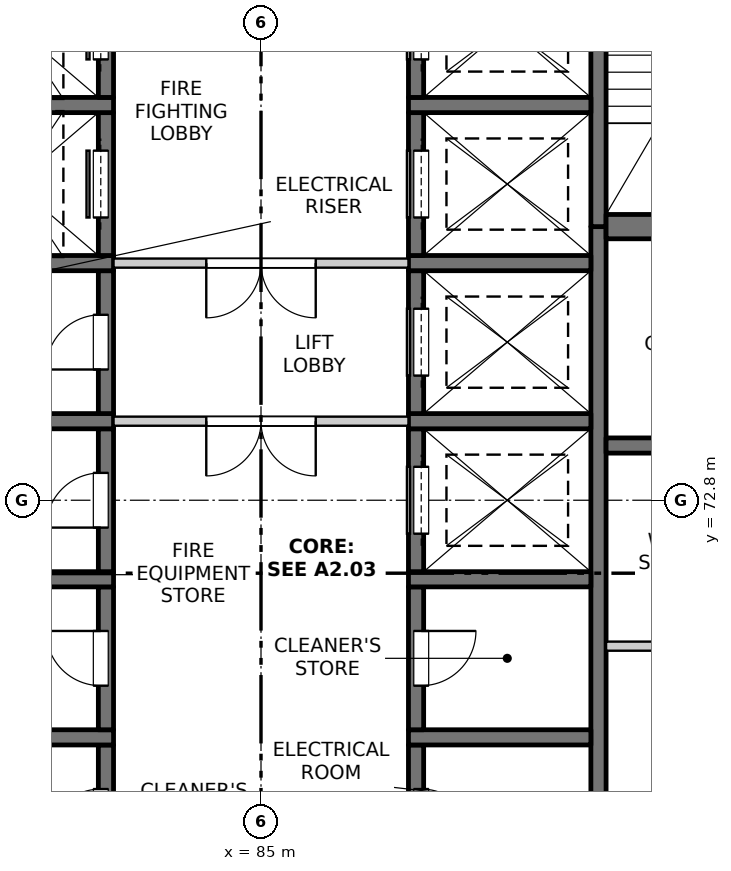
"""IFC4 building model, lengths in metres.
Left out: names, types, materials, properties, quantities, classifications, styles, units other than length and angle.
Written with IfcOpenShell. Run it as: python <this file> out.ifc"""

import sys

from ifc_helpers import new_model, si_unit, direction, frame, frame_2d, origin, place, context, subcontext, project, spatial, rectangle, extrude, element, fill, save


model = new_model("IFC4")
c1 = context("Model", 3, precision=1e-05, world=origin(), true_north=direction((0.0, 1.0)))
c2 = subcontext(c1, "Body", "Model", "MODEL_VIEW")
j1 = project(units=[si_unit("LENGTHUNIT", "METRE"), si_unit("PLANEANGLEUNIT", "RADIAN")], contexts=[c1])
p1 = place(None, origin())
s1 = spatial("IfcSite", under=j1, at=p1, CompositionType="ELEMENT")
p2 = place(p1, origin())
s2 = spatial("IfcBuilding", under=s1, at=p2, CompositionType="ELEMENT")
p3 = place(p2, frame((0.0, 0.0, 204.1)))
s3 = spatial("IfcBuildingStorey", under=s2, at=p3, CompositionType="ELEMENT", Elevation=204.1)
p4 = place(p3, frame((90.55, 61.95, -0.25), z_axis=(0.0, 0.0, 1.0), x_axis=(0.0, 1.0, 0.0)))
e1 = element("IfcWall", 1, at=p4, inside=s3, PredefinedType="SOLIDWALL", context=c2, shape_type="SweptSolid", body=[
    extrude(rectangle(XDim=15.35, YDim=0.25, at=frame_2d((7.675, 0.0))), origin(), (0.0, 0.0, 1.0), 3.4),
])
p5 = place(p3, frame((90.55, 77.3, -0.25), z_axis=(0.0, 0.0, 1.0), x_axis=(0.0, 1.0, 0.0)))
e2 = element("IfcWall", 2, at=p5, inside=s3, PredefinedType="SOLIDWALL", context=c2, shape_type="SweptSolid", body=[
    extrude(rectangle(XDim=7.0, YDim=0.25, at=frame_2d((3.5, 0.0))), origin(), (0.0, 0.0, 1.0), 3.4),
])
p6 = place(p3, frame((82.45, 66.425, -0.25), z_axis=(0.0, 0.0, 1.0), x_axis=(0.0, 1.0, 0.0)))
e3 = element("IfcWall", 3, at=p6, inside=s3, PredefinedType="SOLIDWALL", context=c2, shape_type="SweptSolid", body=[
    extrude(rectangle(XDim=2.35, YDim=0.25, at=frame_2d((1.175, 0.0))), origin(), (0.0, 0.0, 1.0), 3.4),
])
p7 = place(p6, frame((0.725, 0.0, 0.25)))
e4 = element("IfcOpeningElement", 4, at=p7, cuts=e3, PredefinedType="OPENING", context=c2, shape_type="SweptSolid", body=[
    extrude(rectangle(XDim=0.9, YDim=2.1, at=frame_2d((0.45, 1.05))), frame((0.0, 0.135, 0.0), z_axis=(0.0, -1.0, 0.0), x_axis=(1.0, 0.0, 0.0)), (0.0, 0.0, 1.0), 0.27),
])
p8 = place(p3, frame((79.575, 68.9, -0.25), z_axis=(0.0, 0.0, 1.0), x_axis=(1.0, 0.0, 0.0)))
e5 = element("IfcWall", 5, at=p8, inside=s3, PredefinedType="SOLIDWALL", context=c2, shape_type="SweptSolid", body=[
    extrude(rectangle(XDim=3.0, YDim=0.25, at=frame_2d((1.5, 0.0))), origin(), (0.0, 0.0, 1.0), 3.4),
])
p9 = place(p3, frame((82.45, 69.025, -0.25), z_axis=(0.0, 0.0, 1.0), x_axis=(0.0, 1.0, 0.0)))
e6 = element("IfcWall", 6, at=p9, inside=s3, PredefinedType="SOLIDWALL", context=c2, shape_type="SweptSolid", body=[
    extrude(rectangle(XDim=2.35, YDim=0.25, at=frame_2d((1.175, 0.0))), origin(), (0.0, 0.0, 1.0), 3.4),
])
p10 = place(p9, frame((0.725, 0.0, 0.25)))
e7 = element("IfcOpeningElement", 7, at=p10, cuts=e6, PredefinedType="OPENING", context=c2, shape_type="SweptSolid", body=[
    extrude(rectangle(XDim=0.9, YDim=2.1, at=frame_2d((0.45, 1.05))), frame((0.0, 0.135, 0.0), z_axis=(0.0, -1.0, 0.0), x_axis=(1.0, 0.0, 0.0)), (0.0, 0.0, 1.0), 0.27),
])
p11 = place(p3, frame((79.575, 71.5, -0.25), z_axis=(0.0, 0.0, 1.0), x_axis=(1.0, 0.0, 0.0)))
e8 = element("IfcWall", 8, at=p11, inside=s3, PredefinedType="SOLIDWALL", context=c2, shape_type="SweptSolid", body=[
    extrude(rectangle(XDim=3.0, YDim=0.25, at=frame_2d((1.5, 0.0))), origin(), (0.0, 0.0, 1.0), 3.4),
])
p12 = place(p3, frame((82.45, 71.625, -0.25), z_axis=(0.0, 0.0, 1.0), x_axis=(0.0, 1.0, 0.0)))
e9 = element("IfcWall", 9, at=p12, inside=s3, PredefinedType="SOLIDWALL", context=c2, shape_type="SweptSolid", body=[
    extrude(rectangle(XDim=2.35, YDim=0.25, at=frame_2d((1.175, 0.0))), origin(), (0.0, 0.0, 1.0), 3.4),
])
p13 = place(p12, frame((0.725, 0.0, 0.25)))
e10 = element("IfcOpeningElement", 10, at=p13, cuts=e9, PredefinedType="OPENING", context=c2, shape_type="SweptSolid", body=[
    extrude(rectangle(XDim=0.9, YDim=2.1, at=frame_2d((0.45, 1.05))), frame((0.0, 0.135, 0.0), z_axis=(0.0, -1.0, 0.0), x_axis=(1.0, 0.0, 0.0)), (0.0, 0.0, 1.0), 0.27),
])
p14 = place(p3, frame((79.575, 74.1, -0.25), z_axis=(0.0, 0.0, 1.0), x_axis=(1.0, 0.0, 0.0)))
e11 = element("IfcWall", 11, at=p14, inside=s3, PredefinedType="SOLIDWALL", context=c2, shape_type="SweptSolid", body=[
    extrude(rectangle(XDim=3.0, YDim=0.25, at=frame_2d((1.5, 0.0))), origin(), (0.0, 0.0, 1.0), 3.4),
])
p15 = place(p3, frame((82.45, 74.225, -0.25), z_axis=(0.0, 0.0, 1.0), x_axis=(0.0, 1.0, 0.0)))
e12 = element("IfcWall", 12, at=p15, inside=s3, PredefinedType="SOLIDWALL", context=c2, shape_type="SweptSolid", body=[
    extrude(rectangle(XDim=2.35, YDim=0.25, at=frame_2d((1.175, 0.0))), origin(), (0.0, 0.0, 1.0), 3.4),
])
p16 = place(p15, frame((0.725, 0.0, 0.25)))
e13 = element("IfcOpeningElement", 13, at=p16, cuts=e12, PredefinedType="OPENING", context=c2, shape_type="SweptSolid", body=[
    extrude(rectangle(XDim=0.9, YDim=2.1, at=frame_2d((0.45, 1.05))), frame((0.0, 0.135, 0.0), z_axis=(0.0, -1.0, 0.0), x_axis=(1.0, 0.0, 0.0)), (0.0, 0.0, 1.0), 0.27),
])
p17 = place(p3, frame((79.575, 76.7, -0.25), z_axis=(0.0, 0.0, 1.0), x_axis=(1.0, 0.0, 0.0)))
e14 = element("IfcWall", 14, at=p17, inside=s3, PredefinedType="SOLIDWALL", context=c2, shape_type="SweptSolid", body=[
    extrude(rectangle(XDim=3.0, YDim=0.25, at=frame_2d((1.5, 0.0))), origin(), (0.0, 0.0, 1.0), 3.4),
])
p18 = place(p3, frame((82.45, 76.825, -0.25), z_axis=(0.0, 0.0, 1.0), x_axis=(0.0, 1.0, 0.0)))
e15 = element("IfcWall", 15, at=p18, inside=s3, PredefinedType="SOLIDWALL", context=c2, shape_type="SweptSolid", body=[
    extrude(rectangle(XDim=2.35, YDim=0.25, at=frame_2d((1.175, 0.0))), origin(), (0.0, 0.0, 1.0), 3.4),
])
p19 = place(p18, frame((0.625, 0.0, 0.25)))
e16 = element("IfcOpeningElement", 16, at=p19, cuts=e15, PredefinedType="OPENING", context=c2, shape_type="SweptSolid", body=[
    extrude(rectangle(XDim=1.1, YDim=2.1, at=frame_2d((0.55, 1.05))), frame((0.0, 0.135, 0.0), z_axis=(0.0, -1.0, 0.0), x_axis=(1.0, 0.0, 0.0)), (0.0, 0.0, 1.0), 0.27),
])
p20 = place(p3, frame((79.575, 79.3, -0.25), z_axis=(0.0, 0.0, 1.0), x_axis=(1.0, 0.0, 0.0)))
e17 = element("IfcWall", 17, at=p20, inside=s3, PredefinedType="SOLIDWALL", context=c2, shape_type="SweptSolid", body=[
    extrude(rectangle(XDim=3.0, YDim=0.25, at=frame_2d((1.5, 0.0))), origin(), (0.0, 0.0, 1.0), 3.4),
])
p21 = place(p3, frame((82.45, 79.425, -0.25), z_axis=(0.0, 0.0, 1.0), x_axis=(0.0, 1.0, 0.0)))
e18 = element("IfcWall", 18, at=p21, inside=s3, PredefinedType="SOLIDWALL", context=c2, shape_type="SweptSolid", body=[
    extrude(rectangle(XDim=2.35, YDim=0.25, at=frame_2d((1.175, 0.0))), origin(), (0.0, 0.0, 1.0), 3.4),
])
p22 = place(p21, frame((0.625, 0.0, 0.25)))
e19 = element("IfcOpeningElement", 19, at=p22, cuts=e18, PredefinedType="OPENING", context=c2, shape_type="SweptSolid", body=[
    extrude(rectangle(XDim=1.1, YDim=2.1, at=frame_2d((0.55, 1.05))), frame((0.0, 0.135, 0.0), z_axis=(0.0, -1.0, 0.0), x_axis=(1.0, 0.0, 0.0)), (0.0, 0.0, 1.0), 0.27),
])
p23 = place(p3, frame((87.55, 66.425, -0.25), z_axis=(0.0, 0.0, 1.0), x_axis=(0.0, 1.0, 0.0)))
e20 = element("IfcWall", 20, at=p23, inside=s3, PredefinedType="SOLIDWALL", context=c2, shape_type="SweptSolid", body=[
    extrude(rectangle(XDim=2.35, YDim=0.25, at=frame_2d((1.175, 0.0))), origin(), (0.0, 0.0, 1.0), 3.4),
])
p24 = place(p23, frame((0.725, 0.0, 0.25)))
e21 = element("IfcOpeningElement", 21, at=p24, cuts=e20, PredefinedType="OPENING", context=c2, shape_type="SweptSolid", body=[
    extrude(rectangle(XDim=0.9, YDim=2.1, at=frame_2d((0.45, 1.05))), frame((0.0, 0.135, 0.0), z_axis=(0.0, -1.0, 0.0), x_axis=(1.0, 0.0, 0.0)), (0.0, 0.0, 1.0), 0.27),
])
p25 = place(p3, frame((87.425, 68.9, -0.25), z_axis=(0.0, 0.0, 1.0), x_axis=(1.0, 0.0, 0.0)))
e22 = element("IfcWall", 22, at=p25, inside=s3, PredefinedType="SOLIDWALL", context=c2, shape_type="SweptSolid", body=[
    extrude(rectangle(XDim=3.0, YDim=0.25, at=frame_2d((1.5, 0.0))), origin(), (0.0, 0.0, 1.0), 3.4),
])
p26 = place(p3, frame((87.55, 69.025, -0.25), z_axis=(0.0, 0.0, 1.0), x_axis=(0.0, 1.0, 0.0)))
e23 = element("IfcWall", 23, at=p26, inside=s3, PredefinedType="SOLIDWALL", context=c2, shape_type="SweptSolid", body=[
    extrude(rectangle(XDim=2.35, YDim=0.25, at=frame_2d((1.175, 0.0))), origin(), (0.0, 0.0, 1.0), 3.4),
])
p27 = place(p26, frame((0.725, 0.0, 0.25)))
e24 = element("IfcOpeningElement", 24, at=p27, cuts=e23, PredefinedType="OPENING", context=c2, shape_type="SweptSolid", body=[
    extrude(rectangle(XDim=0.9, YDim=2.1, at=frame_2d((0.45, 1.05))), frame((0.0, 0.135, 0.0), z_axis=(0.0, -1.0, 0.0), x_axis=(1.0, 0.0, 0.0)), (0.0, 0.0, 1.0), 0.27),
])
p28 = place(p3, frame((87.425, 71.5, -0.25), z_axis=(0.0, 0.0, 1.0), x_axis=(1.0, 0.0, 0.0)))
e25 = element("IfcWall", 25, at=p28, inside=s3, PredefinedType="SOLIDWALL", context=c2, shape_type="SweptSolid", body=[
    extrude(rectangle(XDim=3.0, YDim=0.25, at=frame_2d((1.5, 0.0))), origin(), (0.0, 0.0, 1.0), 3.4),
])
p29 = place(p3, frame((87.55, 71.625, -0.25), z_axis=(0.0, 0.0, 1.0), x_axis=(0.0, 1.0, 0.0)))
e26 = element("IfcWall", 26, at=p29, inside=s3, PredefinedType="SOLIDWALL", context=c2, shape_type="SweptSolid", body=[
    extrude(rectangle(XDim=2.35, YDim=0.25, at=frame_2d((1.175, 0.0))), origin(), (0.0, 0.0, 1.0), 3.4),
])
p30 = place(p29, frame((0.625, 0.0, 0.25)))
e27 = element("IfcOpeningElement", 27, at=p30, cuts=e26, PredefinedType="OPENING", context=c2, shape_type="SweptSolid", body=[
    extrude(rectangle(XDim=1.1, YDim=2.1, at=frame_2d((0.55, 1.05))), frame((0.0, 0.135, 0.0), z_axis=(0.0, -1.0, 0.0), x_axis=(1.0, 0.0, 0.0)), (0.0, 0.0, 1.0), 0.27),
])
p31 = place(p3, frame((87.425, 74.1, -0.25), z_axis=(0.0, 0.0, 1.0), x_axis=(1.0, 0.0, 0.0)))
e28 = element("IfcWall", 28, at=p31, inside=s3, PredefinedType="SOLIDWALL", context=c2, shape_type="SweptSolid", body=[
    extrude(rectangle(XDim=3.0, YDim=0.25, at=frame_2d((1.5, 0.0))), origin(), (0.0, 0.0, 1.0), 3.4),
])
p32 = place(p3, frame((87.55, 74.225, -0.25), z_axis=(0.0, 0.0, 1.0), x_axis=(0.0, 1.0, 0.0)))
e29 = element("IfcWall", 29, at=p32, inside=s3, PredefinedType="SOLIDWALL", context=c2, shape_type="SweptSolid", body=[
    extrude(rectangle(XDim=2.35, YDim=0.25, at=frame_2d((1.175, 0.0))), origin(), (0.0, 0.0, 1.0), 3.4),
])
p33 = place(p32, frame((0.625, 0.0, 0.25)))
e30 = element("IfcOpeningElement", 30, at=p33, cuts=e29, PredefinedType="OPENING", context=c2, shape_type="SweptSolid", body=[
    extrude(rectangle(XDim=1.1, YDim=2.1, at=frame_2d((0.55, 1.05))), frame((0.0, 0.135, 0.0), z_axis=(0.0, -1.0, 0.0), x_axis=(1.0, 0.0, 0.0)), (0.0, 0.0, 1.0), 0.27),
])
p34 = place(p3, frame((87.425, 76.7, -0.25), z_axis=(0.0, 0.0, 1.0), x_axis=(1.0, 0.0, 0.0)))
e31 = element("IfcWall", 31, at=p34, inside=s3, PredefinedType="SOLIDWALL", context=c2, shape_type="SweptSolid", body=[
    extrude(rectangle(XDim=3.0, YDim=0.25, at=frame_2d((1.5, 0.0))), origin(), (0.0, 0.0, 1.0), 3.4),
])
p35 = place(p3, frame((87.55, 76.825, -0.25), z_axis=(0.0, 0.0, 1.0), x_axis=(0.0, 1.0, 0.0)))
e32 = element("IfcWall", 32, at=p35, inside=s3, PredefinedType="SOLIDWALL", context=c2, shape_type="SweptSolid", body=[
    extrude(rectangle(XDim=2.35, YDim=0.25, at=frame_2d((1.175, 0.0))), origin(), (0.0, 0.0, 1.0), 3.4),
])
p36 = place(p35, frame((0.625, 0.0, 0.25)))
e33 = element("IfcOpeningElement", 33, at=p36, cuts=e32, PredefinedType="OPENING", context=c2, shape_type="SweptSolid", body=[
    extrude(rectangle(XDim=1.1, YDim=2.1, at=frame_2d((0.55, 1.05))), frame((0.0, 0.135, 0.0), z_axis=(0.0, -1.0, 0.0), x_axis=(1.0, 0.0, 0.0)), (0.0, 0.0, 1.0), 0.27),
])
p37 = place(p3, frame((87.425, 79.3, -0.25), z_axis=(0.0, 0.0, 1.0), x_axis=(1.0, 0.0, 0.0)))
e34 = element("IfcWall", 34, at=p37, inside=s3, PredefinedType="SOLIDWALL", context=c2, shape_type="SweptSolid", body=[
    extrude(rectangle(XDim=3.0, YDim=0.25, at=frame_2d((1.5, 0.0))), origin(), (0.0, 0.0, 1.0), 3.4),
])
p38 = place(p3, frame((87.55, 79.425, -0.25), z_axis=(0.0, 0.0, 1.0), x_axis=(0.0, 1.0, 0.0)))
e35 = element("IfcWall", 35, at=p38, inside=s3, PredefinedType="SOLIDWALL", context=c2, shape_type="SweptSolid", body=[
    extrude(rectangle(XDim=2.35, YDim=0.25, at=frame_2d((1.175, 0.0))), origin(), (0.0, 0.0, 1.0), 3.4),
])
p39 = place(p38, frame((0.625, 0.0, 0.25)))
e36 = element("IfcOpeningElement", 36, at=p39, cuts=e35, PredefinedType="OPENING", context=c2, shape_type="SweptSolid", body=[
    extrude(rectangle(XDim=1.1, YDim=2.1, at=frame_2d((0.55, 1.05))), frame((0.0, 0.135, 0.0), z_axis=(0.0, -1.0, 0.0), x_axis=(1.0, 0.0, 0.0)), (0.0, 0.0, 1.0), 0.27),
])
p40 = place(p3, frame((90.675, 73.7, -0.25), z_axis=(0.0, 0.0, 1.0), x_axis=(1.0, 0.0, 0.0)))
e37 = element("IfcWall", 37, at=p40, inside=s3, PredefinedType="SOLIDWALL", context=c2, shape_type="SweptSolid", body=[
    extrude(rectangle(XDim=3.875, YDim=0.25, at=frame_2d((1.938, 0.0))), origin(), (0.0, 0.0, 1.0), 3.4),
])
p41 = place(p3, frame((90.675, 77.3, -0.25), z_axis=(0.0, 0.0, 1.0), x_axis=(1.0, 0.0, 0.0)))
e38 = element("IfcWall", 38, at=p41, inside=s3, PredefinedType="SOLIDWALL", context=c2, shape_type="SweptSolid", body=[
    extrude(rectangle(XDim=3.875, YDim=0.4, at=frame_2d((1.938, 0.0))), origin(), (0.0, 0.0, 1.0), 3.4),
])
p42 = place(p3, frame((90.675, 70.4, 0.0), z_axis=(0.0, 0.0, 1.0), x_axis=(1.0, 0.0, 0.0)))
e39 = element("IfcWall", 39, at=p42, inside=s3, PredefinedType="PARTITIONING", context=c2, shape_type="SweptSolid", body=[
    extrude(rectangle(XDim=3.875, YDim=0.15, at=frame_2d((1.938, 0.0))), origin(), (0.0, 0.0, 1.0), 3.15),
])
p43 = place(p3, frame((82.575, 74.1, 0.0), z_axis=(0.0, 0.0, 1.0), x_axis=(1.0, 0.0, 0.0)))
e40 = element("IfcWall", 40, at=p43, inside=s3, PredefinedType="PARTITIONING", context=c2, shape_type="SweptSolid", body=[
    extrude(rectangle(XDim=4.85, YDim=0.15, at=frame_2d((2.425, 0.0))), origin(), (0.0, 0.0, 1.0), 3.15),
])
p44 = place(p43, frame((1.525, 0.0, 0.0)))
e41 = element("IfcOpeningElement", 41, at=p44, cuts=e40, PredefinedType="OPENING", context=c2, shape_type="SweptSolid", body=[
    extrude(rectangle(XDim=1.8, YDim=2.1, at=frame_2d((0.9, 1.05))), frame((0.0, 0.085, 0.0), z_axis=(0.0, -1.0, 0.0), x_axis=(1.0, 0.0, 0.0)), (0.0, 0.0, 1.0), 0.17),
])
p45 = place(p3, frame((82.575, 76.7, 0.0), z_axis=(0.0, 0.0, 1.0), x_axis=(1.0, 0.0, 0.0)))
e42 = element("IfcWall", 42, at=p45, inside=s3, PredefinedType="PARTITIONING", context=c2, shape_type="SweptSolid", body=[
    extrude(rectangle(XDim=4.85, YDim=0.15, at=frame_2d((2.425, 0.0))), origin(), (0.0, 0.0, 1.0), 3.15),
])
p46 = place(p45, frame((1.525, 0.0, 0.0)))
e43 = element("IfcOpeningElement", 43, at=p46, cuts=e42, PredefinedType="OPENING", context=c2, shape_type="SweptSolid", body=[
    extrude(rectangle(XDim=1.8, YDim=2.1, at=frame_2d((0.9, 1.05))), frame((0.0, 0.085, 0.0), z_axis=(0.0, -1.0, 0.0), x_axis=(1.0, 0.0, 0.0)), (0.0, 0.0, 1.0), 0.17),
])
p47 = place(p7, origin())
e44 = element("IfcDoor", 44, at=p47, inside=s3, OperationType="SINGLE_SWING_LEFT", PredefinedType="DOOR", context=c2, shape_type="SweptSolid", body=[
    extrude(rectangle(XDim=0.9, YDim=2.1, at=frame_2d((0.45, 1.05))), frame((0.0, 0.11, 0.0), z_axis=(0.0, -1.0, 0.0), x_axis=(1.0, 0.0, 0.0)), (0.0, 0.0, 1.0), 0.05),
])
fill(e4, e44)
p48 = place(p24, origin())
e45 = element("IfcDoor", 45, at=p48, inside=s3, OperationType="SINGLE_SWING_RIGHT", PredefinedType="DOOR", context=c2, shape_type="SweptSolid", body=[
    extrude(rectangle(XDim=0.9, YDim=2.1, at=frame_2d((0.45, 1.05))), frame((0.0, -0.06, 0.0), z_axis=(0.0, -1.0, 0.0), x_axis=(1.0, 0.0, 0.0)), (0.0, 0.0, 1.0), 0.05),
])
fill(e21, e45)
p49 = place(p10, origin())
e46 = element("IfcDoor", 46, at=p49, inside=s3, OperationType="SINGLE_SWING_RIGHT", PredefinedType="DOOR", context=c2, shape_type="SweptSolid", body=[
    extrude(rectangle(XDim=0.9, YDim=2.1, at=frame_2d((0.45, 1.05))), frame((0.0, 0.11, 0.0), z_axis=(0.0, -1.0, 0.0), x_axis=(1.0, 0.0, 0.0)), (0.0, 0.0, 1.0), 0.05),
])
fill(e7, e46)
p50 = place(p27, origin())
e47 = element("IfcDoor", 47, at=p50, inside=s3, OperationType="SINGLE_SWING_LEFT", PredefinedType="DOOR", context=c2, shape_type="SweptSolid", body=[
    extrude(rectangle(XDim=0.9, YDim=2.1, at=frame_2d((0.45, 1.05))), frame((0.0, -0.06, 0.0), z_axis=(0.0, -1.0, 0.0), x_axis=(1.0, 0.0, 0.0)), (0.0, 0.0, 1.0), 0.05),
])
fill(e24, e47)
p51 = place(p13, origin())
e48 = element("IfcDoor", 48, at=p51, inside=s3, OperationType="SINGLE_SWING_LEFT", PredefinedType="DOOR", context=c2, shape_type="SweptSolid", body=[
    extrude(rectangle(XDim=0.9, YDim=2.1, at=frame_2d((0.45, 1.05))), frame((0.0, 0.11, 0.0), z_axis=(0.0, -1.0, 0.0), x_axis=(1.0, 0.0, 0.0)), (0.0, 0.0, 1.0), 0.05),
])
fill(e10, e48)
p52 = place(p30, origin())
e49 = element("IfcDoor", 49, at=p52, inside=s3, OperationType="SLIDING_TO_LEFT", PredefinedType="DOOR", context=c2, shape_type="SweptSolid", body=[
    extrude(rectangle(XDim=1.1, YDim=2.1, at=frame_2d((0.55, 1.05))), frame((0.0, -0.06, 0.0), z_axis=(0.0, -1.0, 0.0), x_axis=(1.0, 0.0, 0.0)), (0.0, 0.0, 1.0), 0.05),
])
fill(e27, e49)
p53 = place(p44, origin())
e50 = element("IfcDoor", 50, at=p53, inside=s3, OperationType="DOUBLE_DOOR_SINGLE_SWING", PredefinedType="DOOR", context=c2, shape_type="SweptSolid", body=[
    extrude(rectangle(XDim=1.8, YDim=2.1, at=frame_2d((0.9, 1.05))), frame((0.0, 0.025, 0.0), z_axis=(0.0, -1.0, 0.0), x_axis=(1.0, 0.0, 0.0)), (0.0, 0.0, 1.0), 0.05),
])
fill(e41, e50)
p54 = place(p16, origin())
e51 = element("IfcDoor", 51, at=p54, inside=s3, OperationType="SINGLE_SWING_LEFT", PredefinedType="DOOR", context=c2, shape_type="SweptSolid", body=[
    extrude(rectangle(XDim=0.9, YDim=2.1, at=frame_2d((0.45, 1.05))), frame((0.0, 0.11, 0.0), z_axis=(0.0, -1.0, 0.0), x_axis=(1.0, 0.0, 0.0)), (0.0, 0.0, 1.0), 0.05),
])
fill(e13, e51)
p55 = place(p33, origin())
e52 = element("IfcDoor", 52, at=p55, inside=s3, OperationType="SLIDING_TO_LEFT", PredefinedType="DOOR", context=c2, shape_type="SweptSolid", body=[
    extrude(rectangle(XDim=1.1, YDim=2.1, at=frame_2d((0.55, 1.05))), frame((0.0, -0.06, 0.0), z_axis=(0.0, -1.0, 0.0), x_axis=(1.0, 0.0, 0.0)), (0.0, 0.0, 1.0), 0.05),
])
fill(e30, e52)
p56 = place(p46, origin())
e53 = element("IfcDoor", 53, at=p56, inside=s3, OperationType="DOUBLE_DOOR_SINGLE_SWING", PredefinedType="DOOR", context=c2, shape_type="SweptSolid", body=[
    extrude(rectangle(XDim=1.8, YDim=2.1, at=frame_2d((0.9, 1.05))), frame((0.0, 0.025, 0.0), z_axis=(0.0, -1.0, 0.0), x_axis=(1.0, 0.0, 0.0)), (0.0, 0.0, 1.0), 0.05),
])
fill(e43, e53)
p57 = place(p19, origin())
e54 = element("IfcDoor", 54, at=p57, inside=s3, OperationType="SLIDING_TO_LEFT", PredefinedType="DOOR", context=c2, shape_type="SweptSolid", body=[
    extrude(rectangle(XDim=1.1, YDim=2.1, at=frame_2d((0.55, 1.05))), frame((0.0, 0.11, 0.0), z_axis=(0.0, -1.0, 0.0), x_axis=(1.0, 0.0, 0.0)), (0.0, 0.0, 1.0), 0.05),
])
fill(e16, e54)
p58 = place(p36, origin())
e55 = element("IfcDoor", 55, at=p58, inside=s3, OperationType="SLIDING_TO_LEFT", PredefinedType="DOOR", context=c2, shape_type="SweptSolid", body=[
    extrude(rectangle(XDim=1.1, YDim=2.1, at=frame_2d((0.55, 1.05))), frame((0.0, -0.06, 0.0), z_axis=(0.0, -1.0, 0.0), x_axis=(1.0, 0.0, 0.0)), (0.0, 0.0, 1.0), 0.05),
])
fill(e33, e55)
p59 = place(p22, origin())
e56 = element("IfcDoor", 56, at=p59, inside=s3, OperationType="SLIDING_TO_LEFT", PredefinedType="DOOR", context=c2, shape_type="SweptSolid", body=[
    extrude(rectangle(XDim=1.1, YDim=2.1, at=frame_2d((0.55, 1.05))), frame((0.0, 0.11, 0.0), z_axis=(0.0, -1.0, 0.0), x_axis=(1.0, 0.0, 0.0)), (0.0, 0.0, 1.0), 0.05),
])
fill(e19, e56)
p60 = place(p39, origin())
e57 = element("IfcDoor", 57, at=p60, inside=s3, OperationType="SLIDING_TO_RIGHT", PredefinedType="DOOR", context=c2, shape_type="SweptSolid", body=[
    extrude(rectangle(XDim=1.1, YDim=2.1, at=frame_2d((0.55, 1.05))), frame((0.0, -0.06, 0.0), z_axis=(0.0, -1.0, 0.0), x_axis=(1.0, 0.0, 0.0)), (0.0, 0.0, 1.0), 0.05),
])
fill(e36, e57)
save(model, sys.argv[1])
